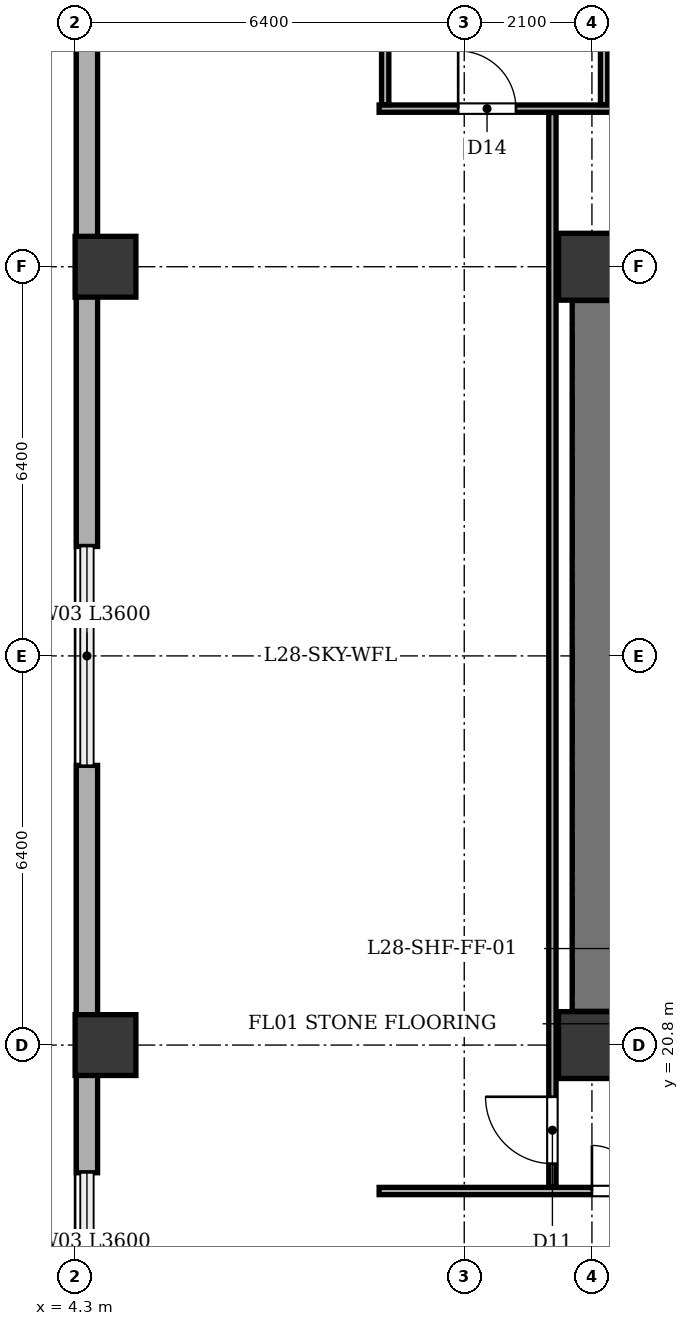
"""IFC4 building model, lengths in metres.
Left out: names, types, materials, properties, quantities, classifications, styles, units other than length and angle.
Written with IfcOpenShell. Run it as: python <this file> out.ifc"""

import sys

from ifc_helpers import new_model, si_unit, direction, frame, frame_2d, origin, origin_2d, place, context, subcontext, project, spatial, rectangle, extrude, element, fill, save


model = new_model("IFC4")
c1 = context("Model", 3, precision=1e-05, world=origin(), true_north=direction((0.0, 1.0)))
c2 = subcontext(c1, "Body", "Model", "MODEL_VIEW")
j1 = project(units=[si_unit("LENGTHUNIT", "METRE"), si_unit("PLANEANGLEUNIT", "RADIAN")], contexts=[c1])
p1 = place(None, origin())
s1 = spatial("IfcSite", under=j1, at=p1, CompositionType="ELEMENT")
p2 = place(p1, origin())
s2 = spatial("IfcBuilding", under=s1, at=p2, CompositionType="ELEMENT")
p3 = place(p2, frame((0.0, 0.0, 115.5)))
s3 = spatial("IfcBuildingStorey", under=s2, at=p3, CompositionType="ELEMENT", Elevation=115.5)
for number, where, z_axis, x_axis in (
    (1, (12.8, 20.8, 0.0), (0.0, 0.0, 1.0), (1.0, 0.0, 0.0)),
    (2, (12.8, 33.6, 0.0), (0.0, 0.0, 1.0), (1.0, 0.0, 0.0)),
):
    element("IfcColumn", number, at=place(p3, frame(where, z_axis=z_axis, x_axis=x_axis)), inside=s3, PredefinedType="COLUMN", context=c2, shape_type="SweptSolid", body=[
        extrude(rectangle(XDim=1.1, YDim=1.1, at=origin_2d()), origin(), (0.0, 0.0, 1.0), 4.8),
    ])
for number, where, z_axis, x_axis in (
    (3, (4.8, 20.8, 0.0), (0.0, 0.0, 1.0), (1.0, 0.0, 0.0)),
    (4, (4.8, 33.6, 0.0), (0.0, 0.0, 1.0), (1.0, 0.0, 0.0)),
):
    element("IfcColumn", number, at=place(p3, frame(where, z_axis=z_axis, x_axis=x_axis)), inside=s3, PredefinedType="COLUMN", context=c2, shape_type="SweptSolid", body=[
        extrude(rectangle(XDim=1.0, YDim=1.0, at=origin_2d()), origin(), (0.0, 0.0, 1.0), 4.8),
    ])
p4 = place(p3, frame((4.495, 18.7, 0.0), z_axis=(0.0, 0.0, 1.0), x_axis=(0.0, 1.0, 0.0)))
e5 = element("IfcWall", 5, at=p4, inside=s3, PredefinedType="STANDARD", context=c2, shape_type="SweptSolid", body=[
    extrude(rectangle(XDim=6.7, YDim=0.35, at=frame_2d((3.35, 0.0))), origin(), (0.0, 0.0, 1.0), 3.735),
])
p5 = place(p3, frame((4.495, 29.0, 0.0), z_axis=(0.0, 0.0, 1.0), x_axis=(0.0, 1.0, 0.0)))
e6 = element("IfcWall", 6, at=p5, inside=s3, PredefinedType="STANDARD", context=c2, shape_type="SweptSolid", body=[
    extrude(rectangle(XDim=18.9, YDim=0.35, at=frame_2d((9.45, 0.0))), origin(), (0.0, 0.0, 1.0), 3.735),
])
p6 = place(p3, frame((12.8, 21.355, 0.0), z_axis=(0.0, 0.0, 1.0), x_axis=(0.0, 1.0, 0.0)))
e7 = element("IfcWall", 7, at=p6, inside=s3, PredefinedType="SHEAR", context=c2, shape_type="SweptSolid", body=[
    extrude(rectangle(XDim=11.69, YDim=0.65, at=frame_2d((5.845, 0.0))), origin(), (0.0, 0.0, 1.0), 4.35),
])
p7 = place(p3, frame((9.3, 18.4, 0.0), z_axis=(0.0, 0.0, 1.0), x_axis=(1.0, 0.0, 0.0)))
e8 = element("IfcWall", 8, at=p7, inside=s3, PredefinedType="PARTITIONING", context=c2, shape_type="SweptSolid", body=[
    extrude(rectangle(XDim=35.0, YDim=0.12, at=frame_2d((17.5, 0.0))), origin(), (0.0, 0.0, 1.0), 4.35),
])
p8 = place(p7, frame((3.5, 0.0, 0.0)))
e9 = element("IfcOpeningElement", 9, at=p8, cuts=e8, PredefinedType="OPENING", context=c2, shape_type="SweptSolid", body=[
    extrude(rectangle(XDim=1.5, YDim=2.15, at=frame_2d((0.75, 1.075))), frame((0.0, 0.07, 0.0), z_axis=(0.0, -1.0, 0.0), x_axis=(1.0, 0.0, 0.0)), (0.0, 0.0, 1.0), 0.14),
])
p9 = place(p7, frame((18.2, 0.0, 0.0)))
e10 = element("IfcOpeningElement", 10, at=p9, cuts=e8, PredefinedType="OPENING", context=c2, shape_type="SweptSolid", body=[
    extrude(rectangle(XDim=1.4, YDim=2.15, at=frame_2d((0.7, 1.075))), frame((0.0, 0.07, 0.0), z_axis=(0.0, -1.0, 0.0), x_axis=(1.0, 0.0, 0.0)), (0.0, 0.0, 1.0), 0.14),
])
p10 = place(p3, frame((9.3, 36.2, 0.0), z_axis=(0.0, 0.0, 1.0), x_axis=(1.0, 0.0, 0.0)))
e11 = element("IfcWall", 11, at=p10, inside=s3, PredefinedType="PARTITIONING", context=c2, shape_type="SweptSolid", body=[
    extrude(rectangle(XDim=35.0, YDim=0.12, at=frame_2d((17.5, 0.0))), origin(), (0.0, 0.0, 1.0), 4.35),
])
p11 = place(p10, frame((1.3, 0.0, 0.0)))
e12 = element("IfcOpeningElement", 12, at=p11, cuts=e11, PredefinedType="OPENING", context=c2, shape_type="SweptSolid", body=[
    extrude(rectangle(XDim=0.95, YDim=2.1, at=frame_2d((0.475, 1.05))), frame((0.0, 0.07, 0.0), z_axis=(0.0, -1.0, 0.0), x_axis=(1.0, 0.0, 0.0)), (0.0, 0.0, 1.0), 0.14),
])
p12 = place(p10, frame((4.9, 0.0, 0.0)))
e13 = element("IfcOpeningElement", 13, at=p12, cuts=e11, PredefinedType="OPENING", context=c2, shape_type="SweptSolid", body=[
    extrude(rectangle(XDim=0.95, YDim=2.1, at=frame_2d((0.475, 1.05))), frame((0.0, 0.07, 0.0), z_axis=(0.0, -1.0, 0.0), x_axis=(1.0, 0.0, 0.0)), (0.0, 0.0, 1.0), 0.14),
])
p13 = place(p10, frame((8.3, 0.0, 0.0)))
e14 = element("IfcOpeningElement", 14, at=p13, cuts=e11, PredefinedType="OPENING", context=c2, shape_type="SweptSolid", body=[
    extrude(rectangle(XDim=1.0, YDim=2.1, at=frame_2d((0.5, 1.05))), frame((0.0, 0.07, 0.0), z_axis=(0.0, -1.0, 0.0), x_axis=(1.0, 0.0, 0.0)), (0.0, 0.0, 1.0), 0.14),
])
p14 = place(p10, frame((13.5, 0.0, 0.0)))
e15 = element("IfcOpeningElement", 15, at=p14, cuts=e11, PredefinedType="OPENING", context=c2, shape_type="SweptSolid", body=[
    extrude(rectangle(XDim=1.5, YDim=2.15, at=frame_2d((0.75, 1.075))), frame((0.0, 0.07, 0.0), z_axis=(0.0, -1.0, 0.0), x_axis=(1.0, 0.0, 0.0)), (0.0, 0.0, 1.0), 0.14),
])
p15 = place(p10, frame((28.0, 0.0, 0.0)))
e16 = element("IfcOpeningElement", 16, at=p15, cuts=e11, PredefinedType="OPENING", context=c2, shape_type="SweptSolid", body=[
    extrude(rectangle(XDim=1.0, YDim=2.1, at=frame_2d((0.5, 1.05))), frame((0.0, 0.07, 0.0), z_axis=(0.0, -1.0, 0.0), x_axis=(1.0, 0.0, 0.0)), (0.0, 0.0, 1.0), 0.14),
])
p16 = place(p3, frame((9.4, 36.265, 0.0), z_axis=(0.0, 0.0, 1.0), x_axis=(0.0, 1.0, 0.0)))
e17 = element("IfcWall", 17, at=p16, inside=s3, PredefinedType="PARTITIONING", context=c2, shape_type="SweptSolid", body=[
    extrude(rectangle(XDim=16.26, YDim=0.12, at=frame_2d((8.13, 0.0))), origin(), (0.0, 0.0, 1.0), 2.935),
])
p17 = place(p3, frame((13.0, 36.265, 0.0), z_axis=(0.0, 0.0, 1.0), x_axis=(0.0, 1.0, 0.0)))
e18 = element("IfcWall", 18, at=p17, inside=s3, PredefinedType="PARTITIONING", context=c2, shape_type="SweptSolid", body=[
    extrude(rectangle(XDim=16.26, YDim=0.12, at=frame_2d((8.13, 0.0))), origin(), (0.0, 0.0, 1.0), 4.35),
])
p18 = place(p3, frame((12.15, 18.465, 0.0), z_axis=(0.0, 0.0, 1.0), x_axis=(0.0, 1.0, 0.0)))
e19 = element("IfcWall", 19, at=p18, inside=s3, PredefinedType="PARTITIONING", context=c2, shape_type="SweptSolid", body=[
    extrude(rectangle(XDim=17.67, YDim=0.12, at=frame_2d((8.835, 0.0))), origin(), (0.0, 0.0, 1.0), 4.35),
])
p19 = place(p18, frame((0.385, 0.0, 0.0)))
e20 = element("IfcOpeningElement", 20, at=p19, cuts=e19, PredefinedType="OPENING", context=c2, shape_type="SweptSolid", body=[
    extrude(rectangle(XDim=1.1, YDim=2.15, at=frame_2d((0.55, 1.075))), frame((0.0, 0.07, 0.0), z_axis=(0.0, -1.0, 0.0), x_axis=(1.0, 0.0, 0.0)), (0.0, 0.0, 1.0), 0.14),
])
p20 = place(p8, origin())
e21 = element("IfcDoor", 21, at=p20, inside=s3, OperationType="DOUBLE_DOOR_SINGLE_SWING", PredefinedType="DOOR", context=c2, shape_type="SweptSolid", body=[
    extrude(rectangle(XDim=1.5, YDim=2.15, at=frame_2d((0.75, 1.075))), frame((0.0, 0.025, 0.0), z_axis=(0.0, -1.0, 0.0), x_axis=(1.0, 0.0, 0.0)), (0.0, 0.0, 1.0), 0.05),
])
fill(e9, e21)
p21 = place(p11, origin())
e22 = element("IfcDoor", 22, at=p21, inside=s3, OperationType="SINGLE_SWING_LEFT", PredefinedType="DOOR", context=c2, shape_type="SweptSolid", body=[
    extrude(rectangle(XDim=0.95, YDim=2.1, at=frame_2d((0.475, 1.05))), frame((0.0, 0.025, 0.0), z_axis=(0.0, -1.0, 0.0), x_axis=(1.0, 0.0, 0.0)), (0.0, 0.0, 1.0), 0.05),
])
fill(e12, e22)
p22 = place(p19, origin())
e23 = element("IfcDoor", 23, at=p22, inside=s3, OperationType="SINGLE_SWING_RIGHT", PredefinedType="DOOR", context=c2, shape_type="SweptSolid", body=[
    extrude(rectangle(XDim=1.1, YDim=2.15, at=frame_2d((0.55, 1.075))), frame((0.0, 0.025, 0.0), z_axis=(0.0, -1.0, 0.0), x_axis=(1.0, 0.0, 0.0)), (0.0, 0.0, 1.0), 0.05),
])
fill(e20, e23)
save(model, sys.argv[1])
